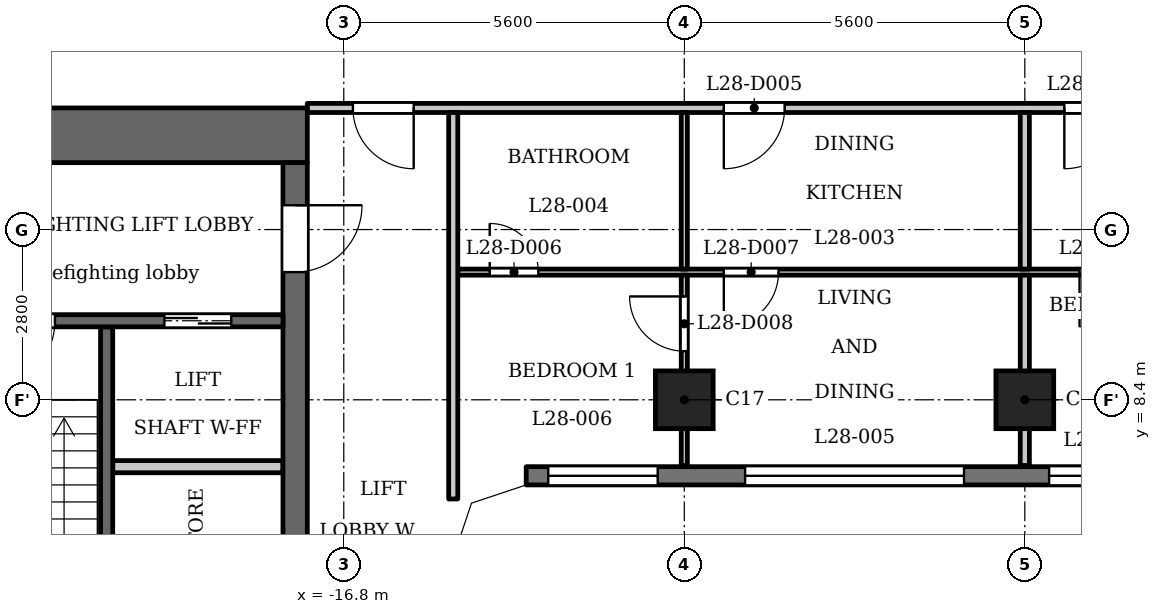
"""IFC4 building model, lengths in metres.
Left out: names, types, materials, properties, quantities, classifications, styles, units other than length and angle.
Written with IfcOpenShell. Run it as: python <this file> out.ifc"""

import sys

from ifc_helpers import new_model, si_unit, direction, frame, frame_2d, origin, origin_2d, place, context, subcontext, project, spatial, polyline, rectangle, outline, extrude, element, fill, save


model = new_model("IFC4")
c1 = context("Model", 3, precision=1e-05, world=origin(), true_north=direction((0.0, 1.0)))
c2 = subcontext(c1, "Body", "Model", "MODEL_VIEW")
j1 = project(units=[si_unit("LENGTHUNIT", "METRE"), si_unit("PLANEANGLEUNIT", "RADIAN")], contexts=[c1])
p1 = place(None, origin())
s1 = spatial("IfcSite", under=j1, at=p1, CompositionType="ELEMENT")
p2 = place(p1, origin())
s2 = spatial("IfcBuilding", under=s1, at=p2, CompositionType="ELEMENT")
p3 = place(p2, frame((0.0, 0.0, 111.3)))
s3 = spatial("IfcBuildingStorey", under=s2, at=p3, CompositionType="ELEMENT", Elevation=111.3)
for number, where, z_axis, x_axis in (
    (1, (-11.2, 8.4, 0.0), (0.0, 0.0, 1.0), (1.0, 0.0, 0.0)),
    (2, (-5.6, 8.4, 0.0), (0.0, 0.0, 1.0), (1.0, 0.0, 0.0)),
):
    element("IfcColumn", number, at=place(p3, frame(where, z_axis=z_axis, x_axis=x_axis)), inside=s3, PredefinedType="COLUMN", context=c2, shape_type="SweptSolid", body=[
        extrude(rectangle(XDim=0.95, YDim=0.95, at=origin_2d()), origin(), (0.0, 0.0, 1.0), 3.5),
    ])
p4 = place(p3, frame((-13.8, 7.15, 0.0), z_axis=(0.0, 0.0, 1.0), x_axis=(1.0, 0.0, 0.0)))
e3 = element("IfcWall", 3, at=p4, inside=s3, PredefinedType="SOLIDWALL", context=c2, shape_type="SweptSolid", body=[
    extrude(rectangle(XDim=27.6, YDim=0.3, at=frame_2d((13.8, 0.0))), origin(), (0.0, 0.0, 1.0), 3.2),
])
p5 = place(p4, frame((0.363, 0.0, 0.9)))
e4 = element("IfcOpeningElement", 4, at=p5, cuts=e3, PredefinedType="OPENING", context=c2, shape_type="SweptSolid", body=[
    extrude(rectangle(XDim=1.8, YDim=1.25, at=frame_2d((0.9, 0.625))), frame((0.0, 0.16, 0.0), z_axis=(0.0, -1.0, 0.0), x_axis=(1.0, 0.0, 0.0)), (0.0, 0.0, 1.0), 0.32),
])
p6 = place(p4, frame((3.6, 0.0, 1.2)))
e5 = element("IfcOpeningElement", 5, at=p6, cuts=e3, PredefinedType="OPENING", context=c2, shape_type="SweptSolid", body=[
    extrude(rectangle(XDim=3.6, YDim=0.95, at=frame_2d((1.8, 0.475))), frame((0.0, 0.16, 0.0), z_axis=(0.0, -1.0, 0.0), x_axis=(1.0, 0.0, 0.0)), (0.0, 0.0, 1.0), 0.32),
])
p7 = place(p4, frame((8.6, 0.0, 0.9)))
e6 = element("IfcOpeningElement", 6, at=p7, cuts=e3, PredefinedType="OPENING", context=c2, shape_type="SweptSolid", body=[
    extrude(rectangle(XDim=1.8, YDim=1.25, at=frame_2d((0.9, 0.625))), frame((0.0, 0.16, 0.0), z_axis=(0.0, -1.0, 0.0), x_axis=(1.0, 0.0, 0.0)), (0.0, 0.0, 1.0), 0.32),
])
p8 = place(p4, frame((11.4, 0.0, 0.9)))
e7 = element("IfcOpeningElement", 7, at=p8, cuts=e3, PredefinedType="OPENING", context=c2, shape_type="SweptSolid", body=[
    extrude(rectangle(XDim=1.8, YDim=1.25, at=frame_2d((0.9, 0.625))), frame((0.0, 0.16, 0.0), z_axis=(0.0, -1.0, 0.0), x_axis=(1.0, 0.0, 0.0)), (0.0, 0.0, 1.0), 0.32),
])
p9 = place(p4, frame((14.8, 0.0, 1.2)))
e8 = element("IfcOpeningElement", 8, at=p9, cuts=e3, PredefinedType="OPENING", context=c2, shape_type="SweptSolid", body=[
    extrude(rectangle(XDim=3.6, YDim=0.95, at=frame_2d((1.8, 0.475))), frame((0.0, 0.16, 0.0), z_axis=(0.0, -1.0, 0.0), x_axis=(1.0, 0.0, 0.0)), (0.0, 0.0, 1.0), 0.32),
])
p10 = place(p4, frame((20.4, 0.0, 1.2)))
e9 = element("IfcOpeningElement", 9, at=p10, cuts=e3, PredefinedType="OPENING", context=c2, shape_type="SweptSolid", body=[
    extrude(rectangle(XDim=3.6, YDim=0.95, at=frame_2d((1.8, 0.475))), frame((0.0, 0.16, 0.0), z_axis=(0.0, -1.0, 0.0), x_axis=(1.0, 0.0, 0.0)), (0.0, 0.0, 1.0), 0.32),
])
p11 = place(p4, frame((25.438, 0.0, 0.9)))
e10 = element("IfcOpeningElement", 10, at=p11, cuts=e3, PredefinedType="OPENING", context=c2, shape_type="SweptSolid", body=[
    extrude(rectangle(XDim=1.8, YDim=1.25, at=frame_2d((0.9, 0.625))), frame((0.0, 0.16, 0.0), z_axis=(0.0, -1.0, 0.0), x_axis=(1.0, 0.0, 0.0)), (0.0, 0.0, 1.0), 0.32),
])
p12 = place(p3, frame((-20.7, 2.6, 0.0), z_axis=(0.0, 0.0, 1.0), x_axis=(0.0, 1.0, 0.0)))
e11 = element("IfcWall", 11, at=p12, inside=s3, PredefinedType="SHEAR", context=c2, shape_type="SweptSolid", body=[
    extrude(rectangle(XDim=7.0, YDim=0.2, at=frame_2d((3.5, 0.0))), origin(), (0.0, 0.0, 1.0), 3.2),
])
p13 = place(p3, frame((-17.4, 12.75, 0.0), z_axis=(0.0, 0.0, 1.0), x_axis=(-1.0, 0.0, 0.0)))
e12 = element("IfcWall", 12, at=p13, inside=s3, PredefinedType="SHEAR", context=c2, shape_type="SweptSolid", body=[
    extrude(rectangle(XDim=10.4, YDim=0.9, at=frame_2d((5.2, 0.0))), origin(), (0.0, 0.0, 1.0), 3.2),
])
p14 = place(p3, frame((-17.6, -12.3, 0.0), z_axis=(0.0, 0.0, 1.0), x_axis=(0.0, 1.0, 0.0)))
e13 = element("IfcWall", 13, at=p14, inside=s3, PredefinedType="SHEAR", context=c2, shape_type="SweptSolid", body=[
    extrude(rectangle(XDim=24.6, YDim=0.4, at=frame_2d((12.3, 0.0))), origin(), (0.0, 0.0, 1.0), 3.2),
])
p15 = place(p14, frame((6.0, 0.0, 0.0)))
e14 = element("IfcOpeningElement", 14, at=p15, cuts=e13, PredefinedType="OPENING", context=c2, shape_type="SweptSolid", body=[
    extrude(rectangle(XDim=1.1, YDim=2.1, at=frame_2d((0.55, 1.05))), frame((0.0, 0.21, 0.0), z_axis=(0.0, -1.0, 0.0), x_axis=(1.0, 0.0, 0.0)), (0.0, 0.0, 1.0), 0.42),
])
p16 = place(p14, frame((8.4, 0.0, 0.0)))
e15 = element("IfcOpeningElement", 15, at=p16, cuts=e13, PredefinedType="OPENING", context=c2, shape_type="SweptSolid", body=[
    extrude(rectangle(XDim=1.1, YDim=2.1, at=frame_2d((0.55, 1.05))), frame((0.0, 0.21, 0.0), z_axis=(0.0, -1.0, 0.0), x_axis=(1.0, 0.0, 0.0)), (0.0, 0.0, 1.0), 0.42),
])
p17 = place(p14, frame((10.8, 0.0, 0.0)))
e16 = element("IfcOpeningElement", 16, at=p17, cuts=e13, PredefinedType="OPENING", context=c2, shape_type="SweptSolid", body=[
    extrude(rectangle(XDim=1.1, YDim=2.1, at=frame_2d((0.55, 1.05))), frame((0.0, 0.21, 0.0), z_axis=(0.0, -1.0, 0.0), x_axis=(1.0, 0.0, 0.0)), (0.0, 0.0, 1.0), 0.42),
])
p18 = place(p14, frame((16.75, 0.0, 0.0)))
e17 = element("IfcOpeningElement", 17, at=p18, cuts=e13, PredefinedType="OPENING", context=c2, shape_type="SweptSolid", body=[
    extrude(rectangle(XDim=0.9, YDim=2.1, at=frame_2d((0.45, 1.05))), frame((0.0, 0.21, 0.0), z_axis=(0.0, -1.0, 0.0), x_axis=(1.0, 0.0, 0.0)), (0.0, 0.0, 1.0), 0.42),
])
p19 = place(p14, frame((22.8, 0.0, 0.0)))
e18 = element("IfcOpeningElement", 18, at=p19, cuts=e13, PredefinedType="OPENING", context=c2, shape_type="SweptSolid", body=[
    extrude(rectangle(XDim=1.1, YDim=2.1, at=frame_2d((0.55, 1.05))), frame((0.0, 0.21, 0.0), z_axis=(0.0, -1.0, 0.0), x_axis=(1.0, 0.0, 0.0)), (0.0, 0.0, 1.0), 0.42),
])
p20 = place(p14, frame((0.7, 0.0, 0.0)))
e19 = element("IfcOpeningElement", 19, at=p20, cuts=e13, PredefinedType="OPENING", context=c2, shape_type="SweptSolid", body=[
    extrude(rectangle(XDim=1.1, YDim=2.1, at=frame_2d((0.55, 1.05))), frame((0.0, 0.21, 0.0), z_axis=(0.0, -1.0, 0.0), x_axis=(1.0, 0.0, 0.0)), (0.0, 0.0, 1.0), 0.42),
])
p21 = place(p14, frame((12.775, 0.0, 0.0)))
e20 = element("IfcOpeningElement", 20, at=p21, cuts=e13, PredefinedType="OPENING", context=c2, shape_type="SweptSolid", body=[
    extrude(rectangle(XDim=1.8, YDim=2.1, at=frame_2d((0.9, 1.05))), frame((0.0, 0.21, 0.0), z_axis=(0.0, -1.0, 0.0), x_axis=(1.0, 0.0, 0.0)), (0.0, 0.0, 1.0), 0.42),
])
p22 = place(p3, frame((-17.8, 7.3, 0.0), z_axis=(0.0, 0.0, 1.0), x_axis=(-1.0, 0.0, 0.0)))
e21 = element("IfcWall", 21, at=p22, inside=s3, PredefinedType="PARTITIONING", context=c2, shape_type="SweptSolid", body=[
    extrude(rectangle(XDim=2.8, YDim=0.2, at=frame_2d((1.4, 0.0))), origin(), (0.0, 0.0, 1.0), 3.2),
])
p23 = place(p3, frame((-17.8, 9.7, 0.0), z_axis=(0.0, 0.0, 1.0), x_axis=(-1.0, 0.0, 0.0)))
e22 = element("IfcWall", 22, at=p23, inside=s3, PredefinedType="SHEAR", context=c2, shape_type="SweptSolid", body=[
    extrude(rectangle(XDim=8.3, YDim=0.2, at=frame_2d((4.15, 0.0))), origin(), (0.0, 0.0, 1.0), 3.2),
])
p24 = place(p23, frame((0.85, 0.0, 0.0)))
e23 = element("IfcOpeningElement", 23, at=p24, cuts=e22, PredefinedType="OPENING", context=c2, shape_type="SweptSolid", body=[
    extrude(rectangle(XDim=1.1, YDim=2.1, at=frame_2d((0.55, 1.05))), frame((0.0, 0.11, 0.0), z_axis=(0.0, -1.0, 0.0), x_axis=(1.0, 0.0, 0.0)), (0.0, 0.0, 1.0), 0.22),
])
p25 = place(p23, frame((3.75, 0.0, 0.0)))
e24 = element("IfcOpeningElement", 24, at=p25, cuts=e22, PredefinedType="OPENING", context=c2, shape_type="SweptSolid", body=[
    extrude(rectangle(XDim=1.1, YDim=2.1, at=frame_2d((0.55, 1.05))), frame((0.0, 0.11, 0.0), z_axis=(0.0, -1.0, 0.0), x_axis=(1.0, 0.0, 0.0)), (0.0, 0.0, 1.0), 0.22),
])
p26 = place(p3, frame((-14.925, 10.5, 0.0), z_axis=(0.0, 0.0, 1.0), x_axis=(1.0, 0.0, 0.0)))
e25 = element("IfcWall", 25, at=p26, inside=s3, PredefinedType="PARTITIONING", context=c2, shape_type="SweptSolid", body=[
    extrude(rectangle(XDim=29.85, YDim=0.1, at=frame_2d((14.925, 0.0))), origin(), (0.0, 0.0, 1.0), 3.2),
])
p27 = place(p26, frame((0.525, 0.0, 0.0)))
e26 = element("IfcOpeningElement", 26, at=p27, cuts=e25, PredefinedType="OPENING", context=c2, shape_type="SweptSolid", body=[
    extrude(rectangle(XDim=0.8, YDim=2.1, at=frame_2d((0.4, 1.05))), frame((0.0, 0.06, 0.0), z_axis=(0.0, -1.0, 0.0), x_axis=(1.0, 0.0, 0.0)), (0.0, 0.0, 1.0), 0.12),
])
p28 = place(p26, frame((4.375, 0.0, 0.0)))
e27 = element("IfcOpeningElement", 27, at=p28, cuts=e25, PredefinedType="OPENING", context=c2, shape_type="SweptSolid", body=[
    extrude(rectangle(XDim=0.9, YDim=2.1, at=frame_2d((0.45, 1.05))), frame((0.0, 0.06, 0.0), z_axis=(0.0, -1.0, 0.0), x_axis=(1.0, 0.0, 0.0)), (0.0, 0.0, 1.0), 0.12),
])
p29 = place(p26, frame((18.825, 0.0, 0.0)))
e28 = element("IfcOpeningElement", 28, at=p29, cuts=e25, PredefinedType="OPENING", context=c2, shape_type="SweptSolid", body=[
    extrude(rectangle(XDim=0.8, YDim=2.1, at=frame_2d((0.4, 1.05))), frame((0.0, 0.06, 0.0), z_axis=(0.0, -1.0, 0.0), x_axis=(1.0, 0.0, 0.0)), (0.0, 0.0, 1.0), 0.12),
])
p30 = place(p26, frame((16.325, 0.0, 0.0)))
e29 = element("IfcOpeningElement", 29, at=p30, cuts=e25, PredefinedType="OPENING", context=c2, shape_type="SweptSolid", body=[
    extrude(rectangle(XDim=0.9, YDim=2.1, at=frame_2d((0.45, 1.05))), frame((0.0, 0.06, 0.0), z_axis=(0.0, -1.0, 0.0), x_axis=(1.0, 0.0, 0.0)), (0.0, 0.0, 1.0), 0.12),
])
p31 = place(p26, frame((10.225, 0.0, 0.0)))
e30 = element("IfcOpeningElement", 30, at=p31, cuts=e25, PredefinedType="OPENING", context=c2, shape_type="SweptSolid", body=[
    extrude(rectangle(XDim=0.9, YDim=2.1, at=frame_2d((0.45, 1.05))), frame((0.0, 0.06, 0.0), z_axis=(0.0, -1.0, 0.0), x_axis=(1.0, 0.0, 0.0)), (0.0, 0.0, 1.0), 0.12),
])
p32 = place(p26, frame((13.325, 0.0, 0.0)))
e31 = element("IfcOpeningElement", 31, at=p32, cuts=e25, PredefinedType="OPENING", context=c2, shape_type="SweptSolid", body=[
    extrude(rectangle(XDim=0.9, YDim=2.1, at=frame_2d((0.45, 1.05))), frame((0.0, 0.06, 0.0), z_axis=(0.0, -1.0, 0.0), x_axis=(1.0, 0.0, 0.0)), (0.0, 0.0, 1.0), 0.12),
])
p33 = place(p26, frame((21.175, 0.0, 0.0)))
e32 = element("IfcOpeningElement", 32, at=p33, cuts=e25, PredefinedType="OPENING", context=c2, shape_type="SweptSolid", body=[
    extrude(rectangle(XDim=0.8, YDim=2.1, at=frame_2d((0.4, 1.05))), frame((0.0, 0.06, 0.0), z_axis=(0.0, -1.0, 0.0), x_axis=(1.0, 0.0, 0.0)), (0.0, 0.0, 1.0), 0.12),
])
p34 = place(p26, frame((26.775, 0.0, 0.0)))
e33 = element("IfcOpeningElement", 33, at=p34, cuts=e25, PredefinedType="OPENING", context=c2, shape_type="SweptSolid", body=[
    extrude(rectangle(XDim=0.9, YDim=2.1, at=frame_2d((0.45, 1.05))), frame((0.0, 0.06, 0.0), z_axis=(0.0, -1.0, 0.0), x_axis=(1.0, 0.0, 0.0)), (0.0, 0.0, 1.0), 0.12),
])
p35 = place(p3, frame((-17.4, 13.2, 0.0), z_axis=(0.0, 0.0, 1.0), x_axis=(1.0, 0.0, 0.0)))
e34 = element("IfcWall", 34, at=p35, inside=s3, PredefinedType="PARTITIONING", context=c2, shape_type="SweptSolid", body=[
    extrude(rectangle(XDim=34.8, YDim=0.15, at=frame_2d((17.4, 0.0))), origin(), (0.0, 0.0, 1.0), 3.2),
])
p36 = place(p35, frame((0.75, 0.0, 0.0)))
e35 = element("IfcOpeningElement", 35, at=p36, cuts=e34, PredefinedType="OPENING", context=c2, shape_type="SweptSolid", body=[
    extrude(rectangle(XDim=1.0, YDim=2.1, at=frame_2d((0.5, 1.05))), frame((0.0, 0.085, 0.0), z_axis=(0.0, -1.0, 0.0), x_axis=(1.0, 0.0, 0.0)), (0.0, 0.0, 1.0), 0.17),
])
p37 = place(p35, frame((33.15, 0.0, 0.0)))
e36 = element("IfcOpeningElement", 36, at=p37, cuts=e34, PredefinedType="OPENING", context=c2, shape_type="SweptSolid", body=[
    extrude(rectangle(XDim=1.0, YDim=2.1, at=frame_2d((0.5, 1.05))), frame((0.0, 0.085, 0.0), z_axis=(0.0, -1.0, 0.0), x_axis=(1.0, 0.0, 0.0)), (0.0, 0.0, 1.0), 0.17),
])
p38 = place(p35, frame((6.85, 0.0, 0.0)))
e37 = element("IfcOpeningElement", 37, at=p38, cuts=e34, PredefinedType="OPENING", context=c2, shape_type="SweptSolid", body=[
    extrude(rectangle(XDim=1.0, YDim=2.1, at=frame_2d((0.5, 1.05))), frame((0.0, 0.085, 0.0), z_axis=(0.0, -1.0, 0.0), x_axis=(1.0, 0.0, 0.0)), (0.0, 0.0, 1.0), 0.17),
])
p39 = place(p35, frame((12.45, 0.0, 0.0)))
e38 = element("IfcOpeningElement", 38, at=p39, cuts=e34, PredefinedType="OPENING", context=c2, shape_type="SweptSolid", body=[
    extrude(rectangle(XDim=1.0, YDim=2.1, at=frame_2d((0.5, 1.05))), frame((0.0, 0.085, 0.0), z_axis=(0.0, -1.0, 0.0), x_axis=(1.0, 0.0, 0.0)), (0.0, 0.0, 1.0), 0.17),
])
p40 = place(p35, frame((29.25, 0.0, 0.0)))
e39 = element("IfcOpeningElement", 39, at=p40, cuts=e34, PredefinedType="OPENING", context=c2, shape_type="SweptSolid", body=[
    extrude(rectangle(XDim=1.0, YDim=2.1, at=frame_2d((0.5, 1.05))), frame((0.0, 0.085, 0.0), z_axis=(0.0, -1.0, 0.0), x_axis=(1.0, 0.0, 0.0)), (0.0, 0.0, 1.0), 0.17),
])
p41 = place(p3, frame((-15.0, 6.769, 0.0), z_axis=(0.0, 0.0, 1.0), x_axis=(0.0, 1.0, 0.0)))
e40 = element("IfcWall", 40, at=p41, inside=s3, PredefinedType="PARTITIONING", context=c2, shape_type="SweptSolid", body=[
    extrude(rectangle(XDim=6.356, YDim=0.15, at=frame_2d((3.178, 0.0))), origin(), (0.0, 0.0, 1.0), 3.2),
])
p42 = place(p3, frame((-11.2, 7.32, 0.0), z_axis=(0.0, 0.0, 1.0), x_axis=(0.0, 1.0, 0.0)))
e41 = element("IfcWall", 41, at=p42, inside=s3, PredefinedType="PARTITIONING", context=c2, shape_type="SweptSolid", body=[
    extrude(rectangle(XDim=3.13, YDim=0.1, at=frame_2d((1.565, 0.0))), origin(), (0.0, 0.0, 1.0), 3.2),
])
p43 = place(p42, frame((1.88, 0.0, 0.0)))
e42 = element("IfcOpeningElement", 42, at=p43, cuts=e41, PredefinedType="OPENING", context=c2, shape_type="SweptSolid", body=[
    extrude(rectangle(XDim=0.9, YDim=2.1, at=frame_2d((0.45, 1.05))), frame((0.0, 0.06, 0.0), z_axis=(0.0, -1.0, 0.0), x_axis=(1.0, 0.0, 0.0)), (0.0, 0.0, 1.0), 0.12),
])
p44 = place(p3, frame((-11.2, 10.55, 0.0), z_axis=(0.0, 0.0, 1.0), x_axis=(0.0, 1.0, 0.0)))
e43 = element("IfcWall", 43, at=p44, inside=s3, PredefinedType="PARTITIONING", context=c2, shape_type="SweptSolid", body=[
    extrude(rectangle(XDim=2.575, YDim=0.1, at=frame_2d((1.288, 0.0))), origin(), (0.0, 0.0, 1.0), 3.2),
])
p45 = place(p3, frame((-5.6, 7.32, 0.0), z_axis=(0.0, 0.0, 1.0), x_axis=(0.0, 1.0, 0.0)))
e44 = element("IfcWall", 44, at=p45, inside=s3, PredefinedType="PARTITIONING", context=c2, shape_type="SweptSolid", body=[
    extrude(rectangle(XDim=3.13, YDim=0.15, at=frame_2d((1.565, 0.0))), origin(), (0.0, 0.0, 1.0), 3.2),
])
p46 = place(p3, frame((-5.6, 10.55, 0.0), z_axis=(0.0, 0.0, 1.0), x_axis=(0.0, 1.0, 0.0)))
e45 = element("IfcWall", 45, at=p46, inside=s3, PredefinedType="PARTITIONING", context=c2, shape_type="SweptSolid", body=[
    extrude(rectangle(XDim=2.575, YDim=0.15, at=frame_2d((1.288, 0.0))), origin(), (0.0, 0.0, 1.0), 3.2),
])
p47 = place(p3, origin())
e46 = element("IfcWall", 46, at=p47, inside=s3, PredefinedType="SOLIDWALL", context=c2, shape_type="SweptSolid", body=[
    extrude(outline(polyline([(-13.849, 7.3), (-14.937, 6.937), (-15.3, 5.849), (-15.3, 5.8), (-15.0, 5.8), (-14.7, 6.7), (-13.8, 7.0), (-13.8, 7.3), (-13.849, 7.3)])), origin(), (0.0, 0.0, 1.0), 3.2),
])
p48 = place(p24, origin())
e47 = element("IfcDoor", 47, at=p48, inside=s3, OperationType="DOUBLE_DOOR_SLIDING", PredefinedType="DOOR", context=c2, shape_type="SweptSolid", body=[
    extrude(rectangle(XDim=1.1, YDim=2.1, at=frame_2d((0.55, 1.05))), frame((0.0, 0.025, 0.0), z_axis=(0.0, -1.0, 0.0), x_axis=(1.0, 0.0, 0.0)), (0.0, 0.0, 1.0), 0.05),
])
fill(e23, e47)
p49 = place(p19, origin())
e48 = element("IfcDoor", 48, at=p49, inside=s3, OperationType="SINGLE_SWING_RIGHT", PredefinedType="DOOR", context=c2, shape_type="SweptSolid", body=[
    extrude(rectangle(XDim=1.1, YDim=2.1, at=frame_2d((0.55, 1.05))), frame((0.0, 0.025, 0.0), z_axis=(0.0, -1.0, 0.0), x_axis=(1.0, 0.0, 0.0)), (0.0, 0.0, 1.0), 0.05),
])
fill(e18, e48)
p50 = place(p25, origin())
e49 = element("IfcDoor", 49, at=p50, inside=s3, OperationType="SINGLE_SWING_LEFT", PredefinedType="DOOR", context=c2, shape_type="SweptSolid", body=[
    extrude(rectangle(XDim=1.1, YDim=2.1, at=frame_2d((0.55, 1.05))), frame((0.0, 0.025, 0.0), z_axis=(0.0, -1.0, 0.0), x_axis=(1.0, 0.0, 0.0)), (0.0, 0.0, 1.0), 0.05),
])
fill(e24, e49)
p51 = place(p36, origin())
e50 = element("IfcDoor", 50, at=p51, inside=s3, OperationType="SINGLE_SWING_RIGHT", PredefinedType="DOOR", context=c2, shape_type="SweptSolid", body=[
    extrude(rectangle(XDim=1.0, YDim=2.1, at=frame_2d((0.5, 1.05))), frame((0.0, 0.025, 0.0), z_axis=(0.0, -1.0, 0.0), x_axis=(1.0, 0.0, 0.0)), (0.0, 0.0, 1.0), 0.05),
])
fill(e35, e50)
p52 = place(p38, origin())
e51 = element("IfcDoor", 51, at=p52, inside=s3, OperationType="SINGLE_SWING_LEFT", PredefinedType="DOOR", context=c2, shape_type="SweptSolid", body=[
    extrude(rectangle(XDim=1.0, YDim=2.1, at=frame_2d((0.5, 1.05))), frame((0.0, 0.025, 0.0), z_axis=(0.0, -1.0, 0.0), x_axis=(1.0, 0.0, 0.0)), (0.0, 0.0, 1.0), 0.05),
])
fill(e37, e51)
p53 = place(p27, origin())
e52 = element("IfcDoor", 52, at=p53, inside=s3, OperationType="SINGLE_SWING_RIGHT", PredefinedType="DOOR", context=c2, shape_type="SweptSolid", body=[
    extrude(rectangle(XDim=0.8, YDim=2.1, at=frame_2d((0.4, 1.05))), frame((0.0, 0.025, 0.0), z_axis=(0.0, -1.0, 0.0), x_axis=(1.0, 0.0, 0.0)), (0.0, 0.0, 1.0), 0.05),
])
fill(e26, e52)
p54 = place(p28, origin())
e53 = element("IfcDoor", 53, at=p54, inside=s3, OperationType="SINGLE_SWING_LEFT", PredefinedType="DOOR", context=c2, shape_type="SweptSolid", body=[
    extrude(rectangle(XDim=0.9, YDim=2.1, at=frame_2d((0.45, 1.05))), frame((0.0, 0.025, 0.0), z_axis=(0.0, -1.0, 0.0), x_axis=(1.0, 0.0, 0.0)), (0.0, 0.0, 1.0), 0.05),
])
fill(e27, e53)
p55 = place(p43, origin())
e54 = element("IfcDoor", 54, at=p55, inside=s3, OperationType="SINGLE_SWING_LEFT", PredefinedType="DOOR", context=c2, shape_type="SweptSolid", body=[
    extrude(rectangle(XDim=0.9, YDim=2.1, at=frame_2d((0.45, 1.05))), frame((0.0, 0.025, 0.0), z_axis=(0.0, -1.0, 0.0), x_axis=(1.0, 0.0, 0.0)), (0.0, 0.0, 1.0), 0.05),
])
fill(e42, e54)
p56 = place(p39, origin())
e55 = element("IfcDoor", 55, at=p56, inside=s3, OperationType="SINGLE_SWING_LEFT", PredefinedType="DOOR", context=c2, shape_type="SweptSolid", body=[
    extrude(rectangle(XDim=1.0, YDim=2.1, at=frame_2d((0.5, 1.05))), frame((0.0, 0.025, 0.0), z_axis=(0.0, -1.0, 0.0), x_axis=(1.0, 0.0, 0.0)), (0.0, 0.0, 1.0), 0.05),
])
fill(e38, e55)
p57 = place(p31, origin())
e56 = element("IfcDoor", 56, at=p57, inside=s3, OperationType="SINGLE_SWING_LEFT", PredefinedType="DOOR", context=c2, shape_type="SweptSolid", body=[
    extrude(rectangle(XDim=0.9, YDim=2.1, at=frame_2d((0.45, 1.05))), frame((0.0, 0.025, 0.0), z_axis=(0.0, -1.0, 0.0), x_axis=(1.0, 0.0, 0.0)), (0.0, 0.0, 1.0), 0.05),
])
fill(e30, e56)
p58 = place(p5, origin())
e57 = element("IfcWindow", 57, at=p58, inside=s3, PartitioningType="SINGLE_PANEL", PredefinedType="WINDOW", context=c2, shape_type="SweptSolid", body=[
    extrude(rectangle(XDim=1.8, YDim=1.25, at=frame_2d((0.9, 0.625))), frame((0.0, 0.03, 0.0), z_axis=(0.0, -1.0, 0.0), x_axis=(1.0, 0.0, 0.0)), (0.0, 0.0, 1.0), 0.06),
])
fill(e4, e57)
p59 = place(p6, origin())
e58 = element("IfcWindow", 58, at=p59, inside=s3, PartitioningType="SINGLE_PANEL", PredefinedType="WINDOW", context=c2, shape_type="SweptSolid", body=[
    extrude(rectangle(XDim=3.6, YDim=0.95, at=frame_2d((1.8, 0.475))), frame((0.0, 0.03, 0.0), z_axis=(0.0, -1.0, 0.0), x_axis=(1.0, 0.0, 0.0)), (0.0, 0.0, 1.0), 0.06),
])
fill(e5, e58)
p60 = place(p7, origin())
e59 = element("IfcWindow", 59, at=p60, inside=s3, PartitioningType="SINGLE_PANEL", PredefinedType="WINDOW", context=c2, shape_type="SweptSolid", body=[
    extrude(rectangle(XDim=1.8, YDim=1.25, at=frame_2d((0.9, 0.625))), frame((0.0, 0.03, 0.0), z_axis=(0.0, -1.0, 0.0), x_axis=(1.0, 0.0, 0.0)), (0.0, 0.0, 1.0), 0.06),
])
fill(e6, e59)
save(model, sys.argv[1])
